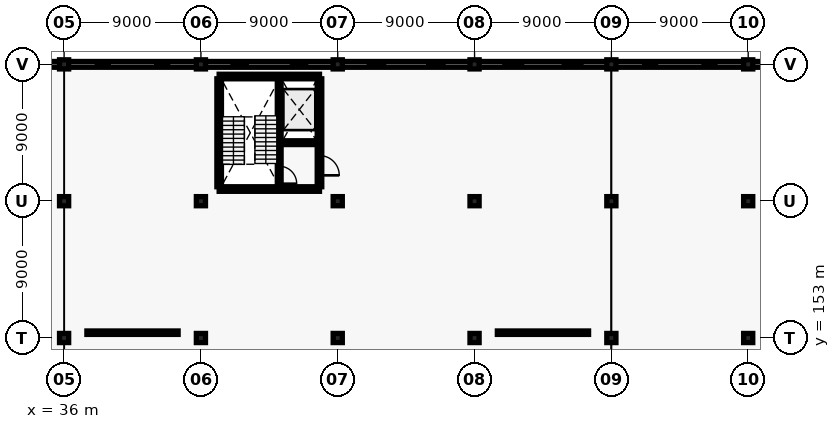
"""IFC4 building model, lengths in metres.
Left out: names, types, materials, properties, quantities, classifications, styles, units other than length and angle.
Written with IfcOpenShell. Run it as: python <this file> out.ifc"""

import sys

from ifc_helpers import new_model, si_unit, direction, frame, frame_2d, origin, origin_2d, place, context, subcontext, project, spatial, rectangle, extrude, element, fill, save


model = new_model("IFC4")
c1 = context("Model", 3, precision=1e-05, world=origin(), true_north=direction((0.0, 1.0)))
c2 = subcontext(c1, "Body", "Model", "MODEL_VIEW")
j1 = project(units=[si_unit("LENGTHUNIT", "METRE"), si_unit("PLANEANGLEUNIT", "RADIAN")], contexts=[c1])
p1 = place(None, origin())
s1 = spatial("IfcSite", under=j1, at=p1, CompositionType="ELEMENT")
p2 = place(p1, origin())
s2 = spatial("IfcBuilding", under=s1, at=p2, CompositionType="ELEMENT")
p3 = place(p2, frame((0.0, 0.0, 5.4)))
s3 = spatial("IfcBuildingStorey", under=s2, at=p3, CompositionType="ELEMENT", Elevation=5.4)
for number, where, z_axis, x_axis in (
    (1, (36.0, 153.0, 0.0), (0.0, 0.0, 1.0), (1.0, 0.0, 0.0)),
    (2, (36.0, 162.0, 0.0), (0.0, 0.0, 1.0), (1.0, 0.0, 0.0)),
    (3, (36.0, 171.0, 0.0), (0.0, 0.0, 1.0), (1.0, 0.0, 0.0)),
    (4, (45.0, 153.0, 0.0), (0.0, 0.0, 1.0), (1.0, 0.0, 0.0)),
    (5, (45.0, 162.0, 0.0), (0.0, 0.0, 1.0), (1.0, 0.0, 0.0)),
    (6, (45.0, 171.0, 0.0), (0.0, 0.0, 1.0), (1.0, 0.0, 0.0)),
    (7, (54.0, 153.0, 0.0), (0.0, 0.0, 1.0), (1.0, 0.0, 0.0)),
    (8, (54.0, 162.0, 0.0), (0.0, 0.0, 1.0), (1.0, 0.0, 0.0)),
    (9, (54.0, 171.0, 0.0), (0.0, 0.0, 1.0), (1.0, 0.0, 0.0)),
    (10, (63.0, 153.0, 0.0), (0.0, 0.0, 1.0), (1.0, 0.0, 0.0)),
    (11, (63.0, 162.0, 0.0), (0.0, 0.0, 1.0), (1.0, 0.0, 0.0)),
    (12, (63.0, 171.0, 0.0), (0.0, 0.0, 1.0), (1.0, 0.0, 0.0)),
    (13, (72.0, 153.0, 0.0), (0.0, 0.0, 1.0), (1.0, 0.0, 0.0)),
    (14, (72.0, 162.0, 0.0), (0.0, 0.0, 1.0), (1.0, 0.0, 0.0)),
    (15, (72.0, 171.0, 0.0), (0.0, 0.0, 1.0), (1.0, 0.0, 0.0)),
    (16, (81.0, 153.0, 0.0), (0.0, 0.0, 1.0), (1.0, 0.0, 0.0)),
    (17, (81.0, 162.0, 0.0), (0.0, 0.0, 1.0), (1.0, 0.0, 0.0)),
    (18, (81.0, 171.0, 0.0), (0.0, 0.0, 1.0), (1.0, 0.0, 0.0)),
):
    element("IfcColumn", number, at=place(p3, frame(where, z_axis=z_axis, x_axis=x_axis)), inside=s3, PredefinedType="COLUMN", context=c2, shape_type="SweptSolid", body=[
        extrude(rectangle(XDim=0.6, YDim=0.6, at=origin_2d()), origin(), (0.0, 0.0, 1.0), 4.2),
    ])
p4 = place(p3, frame((27.06, 171.0, 0.0), z_axis=(0.0, 0.0, 1.0), x_axis=(1.0, 0.0, 0.0)))
e19 = element("IfcWall", 19, at=p4, inside=s3, PredefinedType="SOLIDWALL", context=c2, shape_type="SweptSolid", body=[
    extrude(rectangle(XDim=8.88, YDim=0.38, at=frame_2d((4.44, 0.0))), origin(), (0.0, 0.0, 1.0), 3.4),
])
p5 = place(p4, frame((1.846, 0.0, 0.9)))
e20 = element("IfcOpeningElement", 20, at=p5, cuts=e19, PredefinedType="OPENING", context=c2, shape_type="SweptSolid", body=[
    extrude(rectangle(XDim=1.28, YDim=1.65, at=frame_2d((0.64, 0.825))), frame((0.0, 0.2, 0.0), z_axis=(0.0, -1.0, 0.0), x_axis=(1.0, 0.0, 0.0)), (0.0, 0.0, 1.0), 0.4),
])
p6 = place(p4, frame((5.754, 0.0, 0.9)))
e21 = element("IfcOpeningElement", 21, at=p6, cuts=e19, PredefinedType="OPENING", context=c2, shape_type="SweptSolid", body=[
    extrude(rectangle(XDim=1.28, YDim=1.65, at=frame_2d((0.64, 0.825))), frame((0.0, 0.2, 0.0), z_axis=(0.0, -1.0, 0.0), x_axis=(1.0, 0.0, 0.0)), (0.0, 0.0, 1.0), 0.4),
])
p7 = place(p3, frame((36.06, 171.0, 0.0), z_axis=(0.0, 0.0, 1.0), x_axis=(1.0, 0.0, 0.0)))
e22 = element("IfcWall", 22, at=p7, inside=s3, PredefinedType="SOLIDWALL", context=c2, shape_type="SweptSolid", body=[
    extrude(rectangle(XDim=8.88, YDim=0.38, at=frame_2d((4.44, 0.0))), origin(), (0.0, 0.0, 1.0), 3.4),
])
p8 = place(p7, frame((2.036, 0.0, 0.9)))
e23 = element("IfcOpeningElement", 23, at=p8, cuts=e22, PredefinedType="OPENING", context=c2, shape_type="SweptSolid", body=[
    extrude(rectangle(XDim=0.9, YDim=1.2, at=frame_2d((0.45, 0.6))), frame((0.0, 0.2, 0.0), z_axis=(0.0, -1.0, 0.0), x_axis=(1.0, 0.0, 0.0)), (0.0, 0.0, 1.0), 0.4),
])
p9 = place(p7, frame((5.944, 0.0, 0.9)))
e24 = element("IfcOpeningElement", 24, at=p9, cuts=e22, PredefinedType="OPENING", context=c2, shape_type="SweptSolid", body=[
    extrude(rectangle(XDim=0.9, YDim=1.2, at=frame_2d((0.45, 0.6))), frame((0.0, 0.2, 0.0), z_axis=(0.0, -1.0, 0.0), x_axis=(1.0, 0.0, 0.0)), (0.0, 0.0, 1.0), 0.4),
])
p10 = place(p3, frame((45.06, 171.0, 0.0), z_axis=(0.0, 0.0, 1.0), x_axis=(1.0, 0.0, 0.0)))
e25 = element("IfcWall", 25, at=p10, inside=s3, PredefinedType="SOLIDWALL", context=c2, shape_type="SweptSolid", body=[
    extrude(rectangle(XDim=8.88, YDim=0.38, at=frame_2d((4.44, 0.0))), origin(), (0.0, 0.0, 1.0), 3.4),
])
p11 = place(p10, frame((1.961, 0.0, 0.9)))
e26 = element("IfcOpeningElement", 26, at=p11, cuts=e25, PredefinedType="OPENING", context=c2, shape_type="SweptSolid", body=[
    extrude(rectangle(XDim=1.05, YDim=1.35, at=frame_2d((0.525, 0.675))), frame((0.0, 0.2, 0.0), z_axis=(0.0, -1.0, 0.0), x_axis=(1.0, 0.0, 0.0)), (0.0, 0.0, 1.0), 0.4),
])
p12 = place(p10, frame((5.869, 0.0, 0.9)))
e27 = element("IfcOpeningElement", 27, at=p12, cuts=e25, PredefinedType="OPENING", context=c2, shape_type="SweptSolid", body=[
    extrude(rectangle(XDim=1.05, YDim=1.35, at=frame_2d((0.525, 0.675))), frame((0.0, 0.2, 0.0), z_axis=(0.0, -1.0, 0.0), x_axis=(1.0, 0.0, 0.0)), (0.0, 0.0, 1.0), 0.4),
])
p13 = place(p3, frame((54.06, 171.0, 0.0), z_axis=(0.0, 0.0, 1.0), x_axis=(1.0, 0.0, 0.0)))
e28 = element("IfcWall", 28, at=p13, inside=s3, PredefinedType="SOLIDWALL", context=c2, shape_type="SweptSolid", body=[
    extrude(rectangle(XDim=8.88, YDim=0.38, at=frame_2d((4.44, 0.0))), origin(), (0.0, 0.0, 1.0), 3.4),
])
p14 = place(p13, frame((1.926, 0.0, 0.9)))
e29 = element("IfcOpeningElement", 29, at=p14, cuts=e28, PredefinedType="OPENING", context=c2, shape_type="SweptSolid", body=[
    extrude(rectangle(XDim=1.12, YDim=1.55, at=frame_2d((0.56, 0.775))), frame((0.0, 0.2, 0.0), z_axis=(0.0, -1.0, 0.0), x_axis=(1.0, 0.0, 0.0)), (0.0, 0.0, 1.0), 0.4),
])
p15 = place(p13, frame((5.834, 0.0, 0.9)))
e30 = element("IfcOpeningElement", 30, at=p15, cuts=e28, PredefinedType="OPENING", context=c2, shape_type="SweptSolid", body=[
    extrude(rectangle(XDim=1.12, YDim=1.55, at=frame_2d((0.56, 0.775))), frame((0.0, 0.2, 0.0), z_axis=(0.0, -1.0, 0.0), x_axis=(1.0, 0.0, 0.0)), (0.0, 0.0, 1.0), 0.4),
])
p16 = place(p3, frame((63.06, 171.0, 0.0), z_axis=(0.0, 0.0, 1.0), x_axis=(1.0, 0.0, 0.0)))
e31 = element("IfcWall", 31, at=p16, inside=s3, PredefinedType="SOLIDWALL", context=c2, shape_type="SweptSolid", body=[
    extrude(rectangle(XDim=8.88, YDim=0.38, at=frame_2d((4.44, 0.0))), origin(), (0.0, 0.0, 1.0), 3.4),
])
p17 = place(p16, frame((1.846, 0.0, 0.9)))
e32 = element("IfcOpeningElement", 32, at=p17, cuts=e31, PredefinedType="OPENING", context=c2, shape_type="SweptSolid", body=[
    extrude(rectangle(XDim=1.28, YDim=1.65, at=frame_2d((0.64, 0.825))), frame((0.0, 0.2, 0.0), z_axis=(0.0, -1.0, 0.0), x_axis=(1.0, 0.0, 0.0)), (0.0, 0.0, 1.0), 0.4),
])
p18 = place(p16, frame((5.754, 0.0, 0.9)))
e33 = element("IfcOpeningElement", 33, at=p18, cuts=e31, PredefinedType="OPENING", context=c2, shape_type="SweptSolid", body=[
    extrude(rectangle(XDim=1.28, YDim=1.65, at=frame_2d((0.64, 0.825))), frame((0.0, 0.2, 0.0), z_axis=(0.0, -1.0, 0.0), x_axis=(1.0, 0.0, 0.0)), (0.0, 0.0, 1.0), 0.4),
])
p19 = place(p3, frame((72.06, 171.0, 0.0), z_axis=(0.0, 0.0, 1.0), x_axis=(1.0, 0.0, 0.0)))
e34 = element("IfcWall", 34, at=p19, inside=s3, PredefinedType="SOLIDWALL", context=c2, shape_type="SweptSolid", body=[
    extrude(rectangle(XDim=8.88, YDim=0.38, at=frame_2d((4.44, 0.0))), origin(), (0.0, 0.0, 1.0), 3.4),
])
p20 = place(p19, frame((2.036, 0.0, 0.9)))
e35 = element("IfcOpeningElement", 35, at=p20, cuts=e34, PredefinedType="OPENING", context=c2, shape_type="SweptSolid", body=[
    extrude(rectangle(XDim=0.9, YDim=1.2, at=frame_2d((0.45, 0.6))), frame((0.0, 0.2, 0.0), z_axis=(0.0, -1.0, 0.0), x_axis=(1.0, 0.0, 0.0)), (0.0, 0.0, 1.0), 0.4),
])
p21 = place(p19, frame((5.944, 0.0, 0.9)))
e36 = element("IfcOpeningElement", 36, at=p21, cuts=e34, PredefinedType="OPENING", context=c2, shape_type="SweptSolid", body=[
    extrude(rectangle(XDim=0.9, YDim=1.2, at=frame_2d((0.45, 0.6))), frame((0.0, 0.2, 0.0), z_axis=(0.0, -1.0, 0.0), x_axis=(1.0, 0.0, 0.0)), (0.0, 0.0, 1.0), 0.4),
])
p22 = place(p3, frame((81.06, 171.0, 0.0), z_axis=(0.0, 0.0, 1.0), x_axis=(1.0, 0.0, 0.0)))
e37 = element("IfcWall", 37, at=p22, inside=s3, PredefinedType="SOLIDWALL", context=c2, shape_type="SweptSolid", body=[
    extrude(rectangle(XDim=8.88, YDim=0.38, at=frame_2d((4.44, 0.0))), origin(), (0.0, 0.0, 1.0), 3.4),
])
p23 = place(p22, frame((1.961, 0.0, 0.9)))
e38 = element("IfcOpeningElement", 38, at=p23, cuts=e37, PredefinedType="OPENING", context=c2, shape_type="SweptSolid", body=[
    extrude(rectangle(XDim=1.05, YDim=1.35, at=frame_2d((0.525, 0.675))), frame((0.0, 0.2, 0.0), z_axis=(0.0, -1.0, 0.0), x_axis=(1.0, 0.0, 0.0)), (0.0, 0.0, 1.0), 0.4),
])
p24 = place(p22, frame((5.869, 0.0, 0.9)))
e39 = element("IfcOpeningElement", 39, at=p24, cuts=e37, PredefinedType="OPENING", context=c2, shape_type="SweptSolid", body=[
    extrude(rectangle(XDim=1.05, YDim=1.35, at=frame_2d((0.525, 0.675))), frame((0.0, 0.2, 0.0), z_axis=(0.0, -1.0, 0.0), x_axis=(1.0, 0.0, 0.0)), (0.0, 0.0, 1.0), 0.4),
])
for number, where, z_axis, x_axis in (
    (40, (46.2, 162.8, 0.0), (0.0, 0.0, 1.0), (1.0, 0.0, 0.0)),
    (41, (46.2, 170.2, 0.0), (0.0, 0.0, 1.0), (1.0, 0.0, 0.0)),
):
    element("IfcWall", number, at=place(p3, frame(where, z_axis=z_axis, x_axis=x_axis)), inside=s3, PredefinedType="SHEAR", context=c2, shape_type="SweptSolid", body=[
        extrude(rectangle(XDim=6.6, YDim=0.3, at=frame_2d((3.3, 0.0))), origin(), (0.0, 0.0, 1.0), 4.2),
    ])
p25 = place(p3, frame((46.2, 162.95, 0.0), z_axis=(0.0, 0.0, 1.0), x_axis=(0.0, 1.0, 0.0)))
e42 = element("IfcWall", 42, at=p25, inside=s3, PredefinedType="SHEAR", context=c2, shape_type="SweptSolid", body=[
    extrude(rectangle(XDim=7.1, YDim=0.3, at=frame_2d((3.55, 0.0))), origin(), (0.0, 0.0, 1.0), 4.2),
])
p26 = place(p3, frame((52.8, 162.95, 0.0), z_axis=(0.0, 0.0, 1.0), x_axis=(0.0, 1.0, 0.0)))
e43 = element("IfcWall", 43, at=p26, inside=s3, PredefinedType="SHEAR", context=c2, shape_type="SweptSolid", body=[
    extrude(rectangle(XDim=7.1, YDim=0.3, at=frame_2d((3.55, 0.0))), origin(), (0.0, 0.0, 1.0), 4.2),
])
p27 = place(p26, frame((0.75, 0.0, 0.0)))
e44 = element("IfcOpeningElement", 44, at=p27, cuts=e43, PredefinedType="OPENING", context=c2, shape_type="SweptSolid", body=[
    extrude(rectangle(XDim=1.3, YDim=2.15, at=frame_2d((0.65, 1.075))), frame((0.0, 0.16, 0.0), z_axis=(0.0, -1.0, 0.0), x_axis=(1.0, 0.0, 0.0)), (0.0, 0.0, 1.0), 0.32),
])
p28 = place(p3, frame((50.15, 162.95, 0.0), z_axis=(0.0, 0.0, 1.0), x_axis=(0.0, 1.0, 0.0)))
e45 = element("IfcWall", 45, at=p28, inside=s3, PredefinedType="SHEAR", context=c2, shape_type="SweptSolid", body=[
    extrude(rectangle(XDim=7.1, YDim=0.25, at=frame_2d((3.55, 0.0))), origin(), (0.0, 0.0, 1.0), 4.2),
])
p29 = place(p28, frame((0.2, 0.0, 0.0)))
e46 = element("IfcOpeningElement", 46, at=p29, cuts=e45, PredefinedType="OPENING", context=c2, shape_type="SweptSolid", body=[
    extrude(rectangle(XDim=1.15, YDim=2.15, at=frame_2d((0.575, 1.075))), frame((0.0, 0.135, 0.0), z_axis=(0.0, -1.0, 0.0), x_axis=(1.0, 0.0, 0.0)), (0.0, 0.0, 1.0), 0.27),
])
p30 = place(p3, frame((50.27, 165.85, 0.0), z_axis=(0.0, 0.0, 1.0), x_axis=(1.0, 0.0, 0.0)))
e47 = element("IfcWall", 47, at=p30, inside=s3, PredefinedType="SHEAR", context=c2, shape_type="SweptSolid", body=[
    extrude(rectangle(XDim=2.38, YDim=0.25, at=frame_2d((1.19, 0.0))), origin(), (0.0, 0.0, 1.0), 4.2),
])
p31 = place(p30, frame((0.39, 0.0, 0.0)))
e48 = element("IfcOpeningElement", 48, at=p31, cuts=e47, PredefinedType="OPENING", context=c2, shape_type="SweptSolid", body=[
    extrude(rectangle(XDim=1.6, YDim=2.3, at=frame_2d((0.8, 1.15))), frame((0.0, 0.135, 0.0), z_axis=(0.0, -1.0, 0.0), x_axis=(1.0, 0.0, 0.0)), (0.0, 0.0, 1.0), 0.27),
])
p32 = place(p3, frame((37.5, 153.35, 0.0), z_axis=(0.0, 0.0, 1.0), x_axis=(1.0, 0.0, 0.0)))
e49 = element("IfcWall", 49, at=p32, inside=s3, PredefinedType="PARTITIONING", context=c2, shape_type="SweptSolid", body=[
    extrude(rectangle(XDim=6.0, YDim=0.225, at=frame_2d((3.0, 0.0))), origin(), (0.0, 0.0, 1.0), 3.2),
])
p33 = place(p32, frame((2.1, 0.0, 0.0)))
e50 = element("IfcOpeningElement", 50, at=p33, cuts=e49, PredefinedType="OPENING", context=c2, shape_type="SweptSolid", body=[
    extrude(rectangle(XDim=1.8, YDim=2.4, at=frame_2d((0.9, 1.2))), frame((0.0, 0.123, 0.0), z_axis=(0.0, -1.0, 0.0), x_axis=(1.0, 0.0, 0.0)), (0.0, 0.0, 1.0), 0.245),
])
p34 = place(p3, frame((64.5, 153.35, 0.0), z_axis=(0.0, 0.0, 1.0), x_axis=(1.0, 0.0, 0.0)))
e51 = element("IfcWall", 51, at=p34, inside=s3, PredefinedType="PARTITIONING", context=c2, shape_type="SweptSolid", body=[
    extrude(rectangle(XDim=6.0, YDim=0.225, at=frame_2d((3.0, 0.0))), origin(), (0.0, 0.0, 1.0), 3.2),
])
p35 = place(p34, frame((2.025, 0.0, 0.0)))
e52 = element("IfcOpeningElement", 52, at=p35, cuts=e51, PredefinedType="OPENING", context=c2, shape_type="SweptSolid", body=[
    extrude(rectangle(XDim=1.95, YDim=2.5, at=frame_2d((0.975, 1.25))), frame((0.0, 0.123, 0.0), z_axis=(0.0, -1.0, 0.0), x_axis=(1.0, 0.0, 0.0)), (0.0, 0.0, 1.0), 0.245),
])
p36 = place(p8, origin())
e53 = element("IfcWindow", 53, at=p36, inside=s3, PartitioningType="SINGLE_PANEL", PredefinedType="WINDOW", context=c2, shape_type="SweptSolid", body=[
    extrude(rectangle(XDim=0.9, YDim=1.2, at=frame_2d((0.45, 0.6))), frame((0.0, 0.03, 0.0), z_axis=(0.0, -1.0, 0.0), x_axis=(1.0, 0.0, 0.0)), (0.0, 0.0, 1.0), 0.06),
])
fill(e23, e53)
p37 = place(p9, origin())
e54 = element("IfcWindow", 54, at=p37, inside=s3, PartitioningType="SINGLE_PANEL", PredefinedType="WINDOW", context=c2, shape_type="SweptSolid", body=[
    extrude(rectangle(XDim=0.9, YDim=1.2, at=frame_2d((0.45, 0.6))), frame((0.0, 0.03, 0.0), z_axis=(0.0, -1.0, 0.0), x_axis=(1.0, 0.0, 0.0)), (0.0, 0.0, 1.0), 0.06),
])
fill(e24, e54)
p38 = place(p11, origin())
e55 = element("IfcWindow", 55, at=p38, inside=s3, PartitioningType="SINGLE_PANEL", PredefinedType="WINDOW", context=c2, shape_type="SweptSolid", body=[
    extrude(rectangle(XDim=1.05, YDim=1.35, at=frame_2d((0.525, 0.675))), frame((0.0, 0.03, 0.0), z_axis=(0.0, -1.0, 0.0), x_axis=(1.0, 0.0, 0.0)), (0.0, 0.0, 1.0), 0.06),
])
fill(e26, e55)
p39 = place(p12, origin())
e56 = element("IfcWindow", 56, at=p39, inside=s3, PartitioningType="SINGLE_PANEL", PredefinedType="WINDOW", context=c2, shape_type="SweptSolid", body=[
    extrude(rectangle(XDim=1.05, YDim=1.35, at=frame_2d((0.525, 0.675))), frame((0.0, 0.03, 0.0), z_axis=(0.0, -1.0, 0.0), x_axis=(1.0, 0.0, 0.0)), (0.0, 0.0, 1.0), 0.06),
])
fill(e27, e56)
p40 = place(p14, origin())
e57 = element("IfcWindow", 57, at=p40, inside=s3, PartitioningType="SINGLE_PANEL", PredefinedType="WINDOW", context=c2, shape_type="SweptSolid", body=[
    extrude(rectangle(XDim=1.12, YDim=1.55, at=frame_2d((0.56, 0.775))), frame((0.0, 0.03, 0.0), z_axis=(0.0, -1.0, 0.0), x_axis=(1.0, 0.0, 0.0)), (0.0, 0.0, 1.0), 0.06),
])
fill(e29, e57)
p41 = place(p15, origin())
e58 = element("IfcWindow", 58, at=p41, inside=s3, PartitioningType="SINGLE_PANEL", PredefinedType="WINDOW", context=c2, shape_type="SweptSolid", body=[
    extrude(rectangle(XDim=1.12, YDim=1.55, at=frame_2d((0.56, 0.775))), frame((0.0, 0.03, 0.0), z_axis=(0.0, -1.0, 0.0), x_axis=(1.0, 0.0, 0.0)), (0.0, 0.0, 1.0), 0.06),
])
fill(e30, e58)
p42 = place(p17, origin())
e59 = element("IfcWindow", 59, at=p42, inside=s3, PartitioningType="SINGLE_PANEL", PredefinedType="WINDOW", context=c2, shape_type="SweptSolid", body=[
    extrude(rectangle(XDim=1.28, YDim=1.65, at=frame_2d((0.64, 0.825))), frame((0.0, 0.03, 0.0), z_axis=(0.0, -1.0, 0.0), x_axis=(1.0, 0.0, 0.0)), (0.0, 0.0, 1.0), 0.06),
])
fill(e32, e59)
p43 = place(p18, origin())
e60 = element("IfcWindow", 60, at=p43, inside=s3, PartitioningType="SINGLE_PANEL", PredefinedType="WINDOW", context=c2, shape_type="SweptSolid", body=[
    extrude(rectangle(XDim=1.28, YDim=1.65, at=frame_2d((0.64, 0.825))), frame((0.0, 0.03, 0.0), z_axis=(0.0, -1.0, 0.0), x_axis=(1.0, 0.0, 0.0)), (0.0, 0.0, 1.0), 0.06),
])
fill(e33, e60)
p44 = place(p20, origin())
e61 = element("IfcWindow", 61, at=p44, inside=s3, PartitioningType="SINGLE_PANEL", PredefinedType="WINDOW", context=c2, shape_type="SweptSolid", body=[
    extrude(rectangle(XDim=0.9, YDim=1.2, at=frame_2d((0.45, 0.6))), frame((0.0, 0.03, 0.0), z_axis=(0.0, -1.0, 0.0), x_axis=(1.0, 0.0, 0.0)), (0.0, 0.0, 1.0), 0.06),
])
fill(e35, e61)
p45 = place(p21, origin())
e62 = element("IfcWindow", 62, at=p45, inside=s3, PartitioningType="SINGLE_PANEL", PredefinedType="WINDOW", context=c2, shape_type="SweptSolid", body=[
    extrude(rectangle(XDim=0.9, YDim=1.2, at=frame_2d((0.45, 0.6))), frame((0.0, 0.03, 0.0), z_axis=(0.0, -1.0, 0.0), x_axis=(1.0, 0.0, 0.0)), (0.0, 0.0, 1.0), 0.06),
])
fill(e36, e62)
p46 = place(p27, frame((1.3, 0.0, 0.0), z_axis=(0.0, 0.0, 1.0), x_axis=(-1.0, 0.0, 0.0)))
e63 = element("IfcDoor", 63, at=p46, inside=s3, OperationType="DOUBLE_DOOR_SINGLE_SWING", PredefinedType="DOOR", context=c2, shape_type="SweptSolid", body=[
    extrude(rectangle(XDim=1.3, YDim=2.15, at=frame_2d((0.65, 1.075))), frame((0.0, 0.025, 0.0), z_axis=(0.0, -1.0, 0.0), x_axis=(1.0, 0.0, 0.0)), (0.0, 0.0, 1.0), 0.05),
])
fill(e44, e63)
p47 = place(p29, frame((1.15, 0.0, 0.0), z_axis=(0.0, 0.0, 1.0), x_axis=(-1.0, 0.0, 0.0)))
e64 = element("IfcDoor", 64, at=p47, inside=s3, OperationType="SINGLE_SWING_LEFT", PredefinedType="DOOR", context=c2, shape_type="SweptSolid", body=[
    extrude(rectangle(XDim=1.15, YDim=2.15, at=frame_2d((0.575, 1.075))), frame((0.0, 0.025, 0.0), z_axis=(0.0, -1.0, 0.0), x_axis=(1.0, 0.0, 0.0)), (0.0, 0.0, 1.0), 0.05),
])
fill(e46, e64)
p48 = place(p31, origin())
e65 = element("IfcDoor", 65, at=p48, inside=s3, OperationType="SLIDING_TO_LEFT", PredefinedType="DOOR", context=c2, shape_type="SweptSolid", body=[
    extrude(rectangle(XDim=1.6, YDim=2.3, at=frame_2d((0.8, 1.15))), frame((0.0, 0.025, 0.0), z_axis=(0.0, -1.0, 0.0), x_axis=(1.0, 0.0, 0.0)), (0.0, 0.0, 1.0), 0.05),
])
fill(e48, e65)
p49 = place(p33, origin())
e66 = element("IfcDoor", 66, at=p49, inside=s3, OperationType="SLIDING_TO_RIGHT", PredefinedType="DOOR", context=c2, shape_type="SweptSolid", body=[
    extrude(rectangle(XDim=1.8, YDim=2.4, at=frame_2d((0.9, 1.2))), frame((0.0, 0.025, 0.0), z_axis=(0.0, -1.0, 0.0), x_axis=(1.0, 0.0, 0.0)), (0.0, 0.0, 1.0), 0.05),
])
fill(e50, e66)
p50 = place(p35, origin())
e67 = element("IfcDoor", 67, at=p50, inside=s3, OperationType="SLIDING_TO_LEFT", PredefinedType="DOOR", context=c2, shape_type="SweptSolid", body=[
    extrude(rectangle(XDim=1.95, YDim=2.5, at=frame_2d((0.975, 1.25))), frame((0.0, 0.025, 0.0), z_axis=(0.0, -1.0, 0.0), x_axis=(1.0, 0.0, 0.0)), (0.0, 0.0, 1.0), 0.05),
])
fill(e52, e67)
save(model, sys.argv[1])
